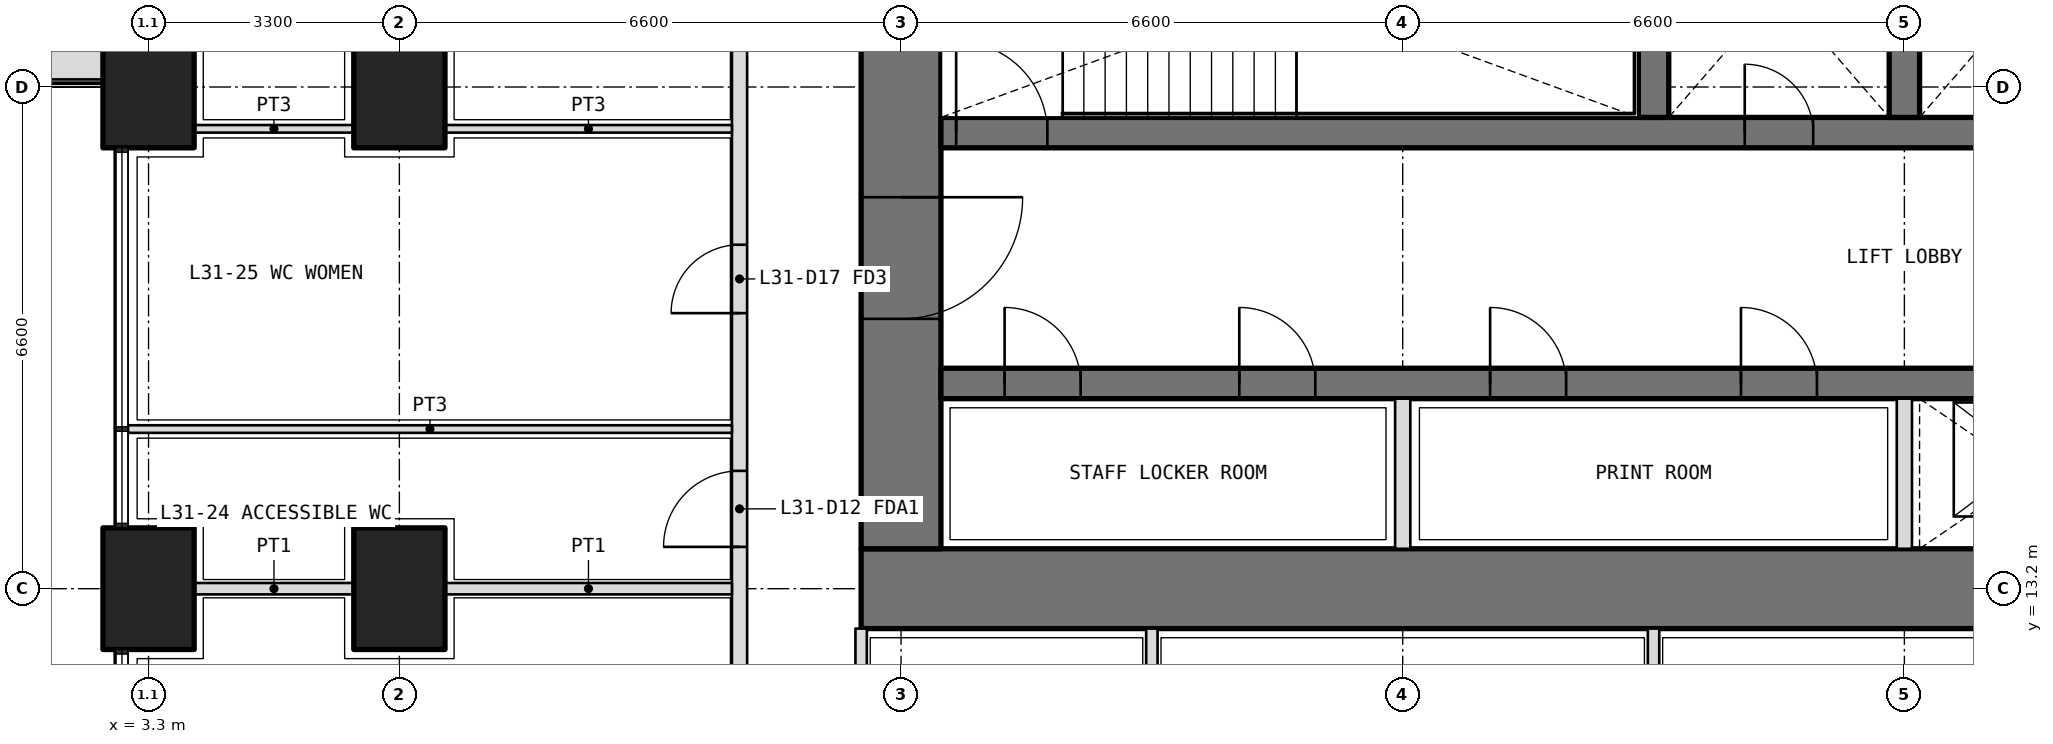
"""IFC4 building model, lengths in metres.
Left out: names, types, materials, properties, quantities, classifications, styles, units other than length and angle.
Written with IfcOpenShell. Run it as: python <this file> out.ifc"""

import sys

from ifc_helpers import new_model, si_unit, direction, frame, frame_2d, origin, origin_2d, place, context, subcontext, project, spatial, polyline, rectangle, outline, extrude, element, fill, save


model = new_model("IFC4")
c1 = context("Model", 3, precision=1e-05, world=origin(), true_north=direction((0.0, 1.0)))
c2 = subcontext(c1, "Body", "Model", "MODEL_VIEW")
j1 = project(units=[si_unit("LENGTHUNIT", "METRE"), si_unit("PLANEANGLEUNIT", "RADIAN")], contexts=[c1])
p1 = place(None, origin())
s1 = spatial("IfcSite", under=j1, at=p1, CompositionType="ELEMENT")
p2 = place(p1, origin())
s2 = spatial("IfcBuilding", under=s1, at=p2, CompositionType="ELEMENT")
p3 = place(p2, frame((0.0, 0.0, 136.8)))
s3 = spatial("IfcBuildingStorey", under=s2, at=p3, CompositionType="ELEMENT", Elevation=136.8)
for number, where, z_axis, x_axis in (
    (1, (3.3, 13.2, 0.0), (0.0, 0.0, 1.0), (0.0, 1.0, 0.0)),
    (2, (3.3, 19.8, 0.0), (0.0, 0.0, 1.0), (0.0, 1.0, 0.0)),
    (3, (6.6, 13.2, 0.0), (0.0, 0.0, 1.0), (0.0, 1.0, 0.0)),
    (4, (6.6, 19.8, 0.0), (0.0, 0.0, 1.0), (0.0, 1.0, 0.0)),
):
    element("IfcColumn", number, at=place(p3, frame(where, z_axis=z_axis, x_axis=x_axis)), inside=s3, PredefinedType="COLUMN", context=c2, shape_type="SweptSolid", body=[
        extrude(rectangle(XDim=1.6, YDim=1.2, at=origin_2d()), origin(), (0.0, 0.0, 1.0), 4.2),
    ])
p4 = place(p3, origin())
e5 = element("IfcWall", 5, at=p4, inside=s3, PredefinedType="USERDEFINED", context=c2, shape_type="SweptSolid", body=[
    extrude(outline(polyline([(1.75, 19.9), (2.75, 19.9), (2.75, 22.35), (1.75, 22.35), (1.75, 19.9)]), holes=[polyline([(1.9, 20.05), (2.6, 20.05), (2.6, 22.2), (1.9, 22.2), (1.9, 20.05)])]), origin(), (0.0, 0.0, 1.0), 1.05),
])
p5 = place(p3, frame((12.675, 13.2, 0.0), z_axis=(0.0, 0.0, 1.0), x_axis=(1.0, 0.0, 0.0)))
e6 = element("IfcWall", 6, at=p5, inside=s3, PredefinedType="SHEAR", context=c2, shape_type="SweptSolid", body=[
    extrude(rectangle(XDim=27.45, YDim=1.05, at=frame_2d((13.725, 0.0))), origin(), (0.0, 0.0, 1.0), 4.2),
])
p6 = place(p3, frame((13.2, 32.475, 0.0), z_axis=(0.0, 0.0, 1.0), x_axis=(0.0, -1.0, 0.0)))
e7 = element("IfcWall", 7, at=p6, inside=s3, PredefinedType="SHEAR", context=c2, shape_type="SweptSolid", body=[
    extrude(rectangle(XDim=18.75, YDim=1.05, at=frame_2d((9.375, 0.0))), origin(), (0.0, 0.0, 1.0), 4.2),
])
p7 = place(p6, frame((14.125, 0.0, 0.0)))
e8 = element("IfcOpeningElement", 8, at=p7, cuts=e7, PredefinedType="OPENING", context=c2, shape_type="SweptSolid", body=[
    extrude(rectangle(XDim=1.6, YDim=2.1, at=frame_2d((0.8, 1.05))), frame((0.0, 0.535, 0.0), z_axis=(0.0, -1.0, 0.0), x_axis=(1.0, 0.0, 0.0)), (0.0, 0.0, 1.0), 1.07),
])
p8 = place(p6, frame((3.325, 0.0, 0.0)))
e9 = element("IfcOpeningElement", 9, at=p8, cuts=e7, PredefinedType="OPENING", context=c2, shape_type="SweptSolid", body=[
    extrude(rectangle(XDim=1.6, YDim=2.1, at=frame_2d((0.8, 1.05))), frame((0.0, 0.535, 0.0), z_axis=(0.0, -1.0, 0.0), x_axis=(1.0, 0.0, 0.0)), (0.0, 0.0, 1.0), 1.07),
])
p9 = place(p3, frame((13.725, 15.9, 0.0), z_axis=(0.0, 0.0, 1.0), x_axis=(1.0, 0.0, 0.0)))
e10 = element("IfcWall", 10, at=p9, inside=s3, PredefinedType="SHEAR", context=c2, shape_type="SweptSolid", body=[
    extrude(rectangle(XDim=25.35, YDim=0.4, at=frame_2d((12.675, 0.0))), origin(), (0.0, 0.0, 1.0), 4.2),
])
p10 = place(p9, frame((0.837, 0.0, 0.0)))
e11 = element("IfcOpeningElement", 11, at=p10, cuts=e10, PredefinedType="OPENING", context=c2, shape_type="SweptSolid", body=[
    extrude(rectangle(XDim=1.0, YDim=2.1, at=frame_2d((0.5, 1.05))), frame((0.0, 0.21, 0.0), z_axis=(0.0, -1.0, 0.0), x_axis=(1.0, 0.0, 0.0)), (0.0, 0.0, 1.0), 0.42),
])
p11 = place(p9, frame((3.925, 0.0, 0.0)))
e12 = element("IfcOpeningElement", 12, at=p11, cuts=e10, PredefinedType="OPENING", context=c2, shape_type="SweptSolid", body=[
    extrude(rectangle(XDim=1.0, YDim=2.1, at=frame_2d((0.5, 1.05))), frame((0.0, 0.21, 0.0), z_axis=(0.0, -1.0, 0.0), x_axis=(1.0, 0.0, 0.0)), (0.0, 0.0, 1.0), 0.42),
])
p12 = place(p9, frame((7.225, 0.0, 0.0)))
e13 = element("IfcOpeningElement", 13, at=p12, cuts=e10, PredefinedType="OPENING", context=c2, shape_type="SweptSolid", body=[
    extrude(rectangle(XDim=1.0, YDim=2.1, at=frame_2d((0.5, 1.05))), frame((0.0, 0.21, 0.0), z_axis=(0.0, -1.0, 0.0), x_axis=(1.0, 0.0, 0.0)), (0.0, 0.0, 1.0), 0.42),
])
p13 = place(p9, frame((10.525, 0.0, 0.0)))
e14 = element("IfcOpeningElement", 14, at=p13, cuts=e10, PredefinedType="OPENING", context=c2, shape_type="SweptSolid", body=[
    extrude(rectangle(XDim=1.0, YDim=2.1, at=frame_2d((0.5, 1.05))), frame((0.0, 0.21, 0.0), z_axis=(0.0, -1.0, 0.0), x_axis=(1.0, 0.0, 0.0)), (0.0, 0.0, 1.0), 0.42),
])
p14 = place(p9, frame((13.775, 0.0, 0.0)))
e15 = element("IfcOpeningElement", 15, at=p14, cuts=e10, PredefinedType="OPENING", context=c2, shape_type="SweptSolid", body=[
    extrude(rectangle(XDim=1.1, YDim=2.1, at=frame_2d((0.55, 1.05))), frame((0.0, 0.21, 0.0), z_axis=(0.0, -1.0, 0.0), x_axis=(1.0, 0.0, 0.0)), (0.0, 0.0, 1.0), 0.42),
])
p15 = place(p9, frame((17.075, 0.0, 0.0)))
e16 = element("IfcOpeningElement", 16, at=p15, cuts=e10, PredefinedType="OPENING", context=c2, shape_type="SweptSolid", body=[
    extrude(rectangle(XDim=1.1, YDim=2.1, at=frame_2d((0.55, 1.05))), frame((0.0, 0.21, 0.0), z_axis=(0.0, -1.0, 0.0), x_axis=(1.0, 0.0, 0.0)), (0.0, 0.0, 1.0), 0.42),
])
p16 = place(p9, frame((20.375, 0.0, 0.0)))
e17 = element("IfcOpeningElement", 17, at=p16, cuts=e10, PredefinedType="OPENING", context=c2, shape_type="SweptSolid", body=[
    extrude(rectangle(XDim=1.1, YDim=2.1, at=frame_2d((0.55, 1.05))), frame((0.0, 0.21, 0.0), z_axis=(0.0, -1.0, 0.0), x_axis=(1.0, 0.0, 0.0)), (0.0, 0.0, 1.0), 0.42),
])
p17 = place(p9, frame((23.462, 0.0, 0.0)))
e18 = element("IfcOpeningElement", 18, at=p17, cuts=e10, PredefinedType="OPENING", context=c2, shape_type="SweptSolid", body=[
    extrude(rectangle(XDim=1.1, YDim=2.1, at=frame_2d((0.55, 1.05))), frame((0.0, 0.21, 0.0), z_axis=(0.0, -1.0, 0.0), x_axis=(1.0, 0.0, 0.0)), (0.0, 0.0, 1.0), 0.42),
])
p18 = place(p3, frame((13.725, 19.2, 0.0), z_axis=(0.0, 0.0, 1.0), x_axis=(1.0, 0.0, 0.0)))
e19 = element("IfcWall", 19, at=p18, inside=s3, PredefinedType="SHEAR", context=c2, shape_type="SweptSolid", body=[
    extrude(rectangle(XDim=25.35, YDim=0.4, at=frame_2d((12.675, 0.0))), origin(), (0.0, 0.0, 1.0), 4.2),
])
p19 = place(p18, frame((10.575, 0.0, 0.0)))
e20 = element("IfcOpeningElement", 20, at=p19, cuts=e19, PredefinedType="OPENING", context=c2, shape_type="SweptSolid", body=[
    extrude(rectangle(XDim=0.9, YDim=2.1, at=frame_2d((0.45, 1.05))), frame((0.0, 0.21, 0.0), z_axis=(0.0, -1.0, 0.0), x_axis=(1.0, 0.0, 0.0)), (0.0, 0.0, 1.0), 0.42),
])
p20 = place(p18, frame((13.875, 0.0, 0.0)))
e21 = element("IfcOpeningElement", 21, at=p20, cuts=e19, PredefinedType="OPENING", context=c2, shape_type="SweptSolid", body=[
    extrude(rectangle(XDim=0.9, YDim=2.1, at=frame_2d((0.45, 1.05))), frame((0.0, 0.21, 0.0), z_axis=(0.0, -1.0, 0.0), x_axis=(1.0, 0.0, 0.0)), (0.0, 0.0, 1.0), 0.42),
])
p21 = place(p18, frame((0.2, 0.0, 0.0)))
e22 = element("IfcOpeningElement", 22, at=p21, cuts=e19, PredefinedType="OPENING", context=c2, shape_type="SweptSolid", body=[
    extrude(rectangle(XDim=1.2, YDim=2.1, at=frame_2d((0.6, 1.05))), frame((0.0, 0.21, 0.0), z_axis=(0.0, -1.0, 0.0), x_axis=(1.0, 0.0, 0.0)), (0.0, 0.0, 1.0), 0.42),
])
p22 = place(p18, frame((23.512, 0.0, 0.0)))
e23 = element("IfcOpeningElement", 23, at=p22, cuts=e19, PredefinedType="OPENING", context=c2, shape_type="SweptSolid", body=[
    extrude(rectangle(XDim=1.1, YDim=2.1, at=frame_2d((0.55, 1.05))), frame((0.0, 0.21, 0.0), z_axis=(0.0, -1.0, 0.0), x_axis=(1.0, 0.0, 0.0)), (0.0, 0.0, 1.0), 0.42),
])
p23 = place(p18, frame((17.125, 0.0, 0.0)))
e24 = element("IfcOpeningElement", 24, at=p23, cuts=e19, PredefinedType="OPENING", context=c2, shape_type="SweptSolid", body=[
    extrude(rectangle(XDim=1.1, YDim=2.1, at=frame_2d((0.55, 1.05))), frame((0.0, 0.21, 0.0), z_axis=(0.0, -1.0, 0.0), x_axis=(1.0, 0.0, 0.0)), (0.0, 0.0, 1.0), 0.42),
])
p24 = place(p18, frame((20.325, 0.0, 0.0)))
e25 = element("IfcOpeningElement", 25, at=p24, cuts=e19, PredefinedType="OPENING", context=c2, shape_type="SweptSolid", body=[
    extrude(rectangle(XDim=1.1, YDim=2.1, at=frame_2d((0.55, 1.05))), frame((0.0, 0.21, 0.0), z_axis=(0.0, -1.0, 0.0), x_axis=(1.0, 0.0, 0.0)), (0.0, 0.0, 1.0), 0.42),
])
for number, where, z_axis, x_axis in (
    (26, (23.1, 19.4, 0.0), (0.0, 0.0, 1.0), (0.0, 1.0, 0.0)),
    (27, (26.4, 19.4, 0.0), (0.0, 0.0, 1.0), (0.0, 1.0, 0.0)),
):
    element("IfcWall", number, at=place(p3, frame(where, z_axis=z_axis, x_axis=x_axis)), inside=s3, PredefinedType="SHEAR", context=c2, shape_type="SweptSolid", body=[
        extrude(rectangle(XDim=3.35, YDim=0.4, at=frame_2d((1.675, 0.0))), origin(), (0.0, 0.0, 1.0), 4.2),
    ])
for number, where, z_axis, x_axis in (
    (28, (19.8, 13.725, 0.0), (0.0, 0.0, 1.0), (0.0, 1.0, 0.0)),
    (29, (26.4, 13.725, 0.0), (0.0, 0.0, 1.0), (0.0, 1.0, 0.0)),
):
    element("IfcWall", number, at=place(p3, frame(where, z_axis=z_axis, x_axis=x_axis)), inside=s3, PredefinedType="PARTITIONING", context=c2, shape_type="SweptSolid", body=[
        extrude(rectangle(XDim=1.975, YDim=0.2, at=frame_2d((0.987, 0.0))), origin(), (0.0, 0.0, 1.0), 4.2),
    ])
p25 = place(p3, frame((12.675, 12.675, 0.0), z_axis=(0.0, 0.0, 1.0), x_axis=(0.0, -1.0, 0.0)))
e30 = element("IfcWall", 30, at=p25, inside=s3, PredefinedType="PARTITIONING", context=c2, shape_type="SweptSolid", body=[
    extrude(rectangle(XDim=3.675, YDim=0.15, at=frame_2d((1.837, 0.0))), origin(), (0.0, 0.0, 1.0), 2.85),
])
for number, where, z_axis, x_axis in (
    (31, (16.5, 12.675, 0.0), (0.0, 0.0, 1.0), (0.0, -1.0, 0.0)),
    (32, (23.1, 12.675, 0.0), (0.0, 0.0, 1.0), (0.0, -1.0, 0.0)),
):
    element("IfcWall", number, at=place(p3, frame(where, z_axis=z_axis, x_axis=x_axis)), inside=s3, PredefinedType="PARTITIONING", context=c2, shape_type="SweptSolid", body=[
        extrude(rectangle(XDim=3.675, YDim=0.15, at=frame_2d((1.837, 0.0))), origin(), (0.0, 0.0, 1.0), 3.9),
    ])
p26 = place(p3, frame((11.075, 7.4, 0.0), z_axis=(0.0, 0.0, 1.0), x_axis=(0.0, 1.0, 0.0)))
e33 = element("IfcWall", 33, at=p26, inside=s3, PredefinedType="PARTITIONING", context=c2, shape_type="SweptSolid", body=[
    extrude(rectangle(XDim=27.625, YDim=0.2, at=frame_2d((13.812, 0.0))), origin(), (0.0, 0.0, 1.0), 2.85),
])
p27 = place(p26, frame((2.35, 0.0, 0.0)))
e34 = element("IfcOpeningElement", 34, at=p27, cuts=e33, PredefinedType="OPENING", context=c2, shape_type="SweptSolid", body=[
    extrude(rectangle(XDim=1.0, YDim=2.1, at=frame_2d((0.5, 1.05))), frame((0.0, 0.11, 0.0), z_axis=(0.0, -1.0, 0.0), x_axis=(1.0, 0.0, 0.0)), (0.0, 0.0, 1.0), 0.22),
])
p28 = place(p26, frame((6.35, 0.0, 0.0)))
e35 = element("IfcOpeningElement", 35, at=p28, cuts=e33, PredefinedType="OPENING", context=c2, shape_type="SweptSolid", body=[
    extrude(rectangle(XDim=1.0, YDim=2.1, at=frame_2d((0.5, 1.05))), frame((0.0, 0.11, 0.0), z_axis=(0.0, -1.0, 0.0), x_axis=(1.0, 0.0, 0.0)), (0.0, 0.0, 1.0), 0.22),
])
p29 = place(p26, frame((9.425, 0.0, 0.0)))
e36 = element("IfcOpeningElement", 36, at=p29, cuts=e33, PredefinedType="OPENING", context=c2, shape_type="SweptSolid", body=[
    extrude(rectangle(XDim=0.9, YDim=2.1, at=frame_2d((0.45, 1.05))), frame((0.0, 0.11, 0.0), z_axis=(0.0, -1.0, 0.0), x_axis=(1.0, 0.0, 0.0)), (0.0, 0.0, 1.0), 0.22),
])
p30 = place(p26, frame((13.275, 0.0, 0.0)))
e37 = element("IfcOpeningElement", 37, at=p30, cuts=e33, PredefinedType="OPENING", context=c2, shape_type="SweptSolid", body=[
    extrude(rectangle(XDim=0.9, YDim=2.1, at=frame_2d((0.45, 1.05))), frame((0.0, 0.11, 0.0), z_axis=(0.0, -1.0, 0.0), x_axis=(1.0, 0.0, 0.0)), (0.0, 0.0, 1.0), 0.22),
])
p31 = place(p26, frame((16.8, 0.0, 0.0)))
e38 = element("IfcOpeningElement", 38, at=p31, cuts=e33, PredefinedType="OPENING", context=c2, shape_type="SweptSolid", body=[
    extrude(rectangle(XDim=1.0, YDim=2.1, at=frame_2d((0.5, 1.05))), frame((0.0, 0.11, 0.0), z_axis=(0.0, -1.0, 0.0), x_axis=(1.0, 0.0, 0.0)), (0.0, 0.0, 1.0), 0.22),
])
p32 = place(p26, frame((21.8, 0.0, 0.0)))
e39 = element("IfcOpeningElement", 39, at=p32, cuts=e33, PredefinedType="OPENING", context=c2, shape_type="SweptSolid", body=[
    extrude(rectangle(XDim=1.0, YDim=2.1, at=frame_2d((0.5, 1.05))), frame((0.0, 0.11, 0.0), z_axis=(0.0, -1.0, 0.0), x_axis=(1.0, 0.0, 0.0)), (0.0, 0.0, 1.0), 0.22),
])
p33 = place(p26, frame((26.163, 0.0, 0.0)))
e40 = element("IfcOpeningElement", 40, at=p33, cuts=e33, PredefinedType="OPENING", context=c2, shape_type="SweptSolid", body=[
    extrude(rectangle(XDim=1.0, YDim=2.1, at=frame_2d((0.5, 1.05))), frame((0.0, 0.11, 0.0), z_axis=(0.0, -1.0, 0.0), x_axis=(1.0, 0.0, 0.0)), (0.0, 0.0, 1.0), 0.22),
])
p34 = place(p3, frame((3.03, 15.3, 0.0), z_axis=(0.0, 0.0, 1.0), x_axis=(1.0, 0.0, 0.0)))
e41 = element("IfcWall", 41, at=p34, inside=s3, PredefinedType="PARTITIONING", context=c2, shape_type="SweptSolid", body=[
    extrude(rectangle(XDim=7.945, YDim=0.1, at=frame_2d((3.973, 0.0))), origin(), (0.0, 0.0, 1.0), 2.6),
])
p35 = place(p3, frame((3.9, 19.25, 0.0), z_axis=(0.0, 0.0, 1.0), x_axis=(1.0, 0.0, 0.0)))
e42 = element("IfcWall", 42, at=p35, inside=s3, PredefinedType="PARTITIONING", context=c2, shape_type="SweptSolid", body=[
    extrude(rectangle(XDim=2.1, YDim=0.1, at=frame_2d((1.05, 0.0))), origin(), (0.0, 0.0, 1.0), 2.85),
])
p36 = place(p3, frame((7.2, 19.25, 0.0), z_axis=(0.0, 0.0, 1.0), x_axis=(1.0, 0.0, 0.0)))
e43 = element("IfcWall", 43, at=p36, inside=s3, PredefinedType="PARTITIONING", context=c2, shape_type="SweptSolid", body=[
    extrude(rectangle(XDim=3.775, YDim=0.1, at=frame_2d((1.888, 0.0))), origin(), (0.0, 0.0, 1.0), 2.85),
])
p37 = place(p3, frame((3.9, 13.2, 0.0), z_axis=(0.0, 0.0, 1.0), x_axis=(1.0, 0.0, 0.0)))
e44 = element("IfcWall", 44, at=p37, inside=s3, PredefinedType="PARTITIONING", context=c2, shape_type="SweptSolid", body=[
    extrude(rectangle(XDim=2.1, YDim=0.15, at=frame_2d((1.05, 0.0))), origin(), (0.0, 0.0, 1.0), 2.85),
])
p38 = place(p3, frame((7.2, 13.2, 0.0), z_axis=(0.0, 0.0, 1.0), x_axis=(1.0, 0.0, 0.0)))
e45 = element("IfcWall", 45, at=p38, inside=s3, PredefinedType="PARTITIONING", context=c2, shape_type="SweptSolid", body=[
    extrude(rectangle(XDim=3.775, YDim=0.15, at=frame_2d((1.888, 0.0))), origin(), (0.0, 0.0, 1.0), 2.85),
])
p39 = place(p28, origin())
e46 = element("IfcDoor", 46, at=p39, inside=s3, OperationType="SINGLE_SWING_LEFT", PredefinedType="DOOR", context=c2, shape_type="SweptSolid", body=[
    extrude(rectangle(XDim=1.0, YDim=2.1, at=frame_2d((0.5, 1.05))), frame((0.0, 0.025, 0.0), z_axis=(0.0, -1.0, 0.0), x_axis=(1.0, 0.0, 0.0)), (0.0, 0.0, 1.0), 0.05),
])
fill(e35, e46)
p40 = place(p29, origin())
e47 = element("IfcDoor", 47, at=p40, inside=s3, OperationType="SINGLE_SWING_LEFT", PredefinedType="DOOR", context=c2, shape_type="SweptSolid", body=[
    extrude(rectangle(XDim=0.9, YDim=2.1, at=frame_2d((0.45, 1.05))), frame((0.0, 0.025, 0.0), z_axis=(0.0, -1.0, 0.0), x_axis=(1.0, 0.0, 0.0)), (0.0, 0.0, 1.0), 0.05),
])
fill(e36, e47)
p41 = place(p19, origin())
e48 = element("IfcDoor", 48, at=p41, inside=s3, OperationType="SINGLE_SWING_LEFT", PredefinedType="DOOR", context=c2, shape_type="SweptSolid", body=[
    extrude(rectangle(XDim=0.9, YDim=2.1, at=frame_2d((0.45, 1.05))), frame((0.0, 0.025, 0.0), z_axis=(0.0, -1.0, 0.0), x_axis=(1.0, 0.0, 0.0)), (0.0, 0.0, 1.0), 0.05),
])
fill(e20, e48)
p42 = place(p10, origin())
e49 = element("IfcDoor", 49, at=p42, inside=s3, OperationType="SINGLE_SWING_LEFT", PredefinedType="DOOR", context=c2, shape_type="SweptSolid", body=[
    extrude(rectangle(XDim=1.0, YDim=2.1, at=frame_2d((0.5, 1.05))), frame((0.0, 0.025, 0.0), z_axis=(0.0, -1.0, 0.0), x_axis=(1.0, 0.0, 0.0)), (0.0, 0.0, 1.0), 0.05),
])
fill(e11, e49)
p43 = place(p11, origin())
e50 = element("IfcDoor", 50, at=p43, inside=s3, OperationType="SINGLE_SWING_LEFT", PredefinedType="DOOR", context=c2, shape_type="SweptSolid", body=[
    extrude(rectangle(XDim=1.0, YDim=2.1, at=frame_2d((0.5, 1.05))), frame((0.0, 0.025, 0.0), z_axis=(0.0, -1.0, 0.0), x_axis=(1.0, 0.0, 0.0)), (0.0, 0.0, 1.0), 0.05),
])
fill(e12, e50)
p44 = place(p12, origin())
e51 = element("IfcDoor", 51, at=p44, inside=s3, OperationType="SINGLE_SWING_LEFT", PredefinedType="DOOR", context=c2, shape_type="SweptSolid", body=[
    extrude(rectangle(XDim=1.0, YDim=2.1, at=frame_2d((0.5, 1.05))), frame((0.0, 0.025, 0.0), z_axis=(0.0, -1.0, 0.0), x_axis=(1.0, 0.0, 0.0)), (0.0, 0.0, 1.0), 0.05),
])
fill(e13, e51)
p45 = place(p13, origin())
e52 = element("IfcDoor", 52, at=p45, inside=s3, OperationType="SINGLE_SWING_LEFT", PredefinedType="DOOR", context=c2, shape_type="SweptSolid", body=[
    extrude(rectangle(XDim=1.0, YDim=2.1, at=frame_2d((0.5, 1.05))), frame((0.0, 0.025, 0.0), z_axis=(0.0, -1.0, 0.0), x_axis=(1.0, 0.0, 0.0)), (0.0, 0.0, 1.0), 0.05),
])
fill(e14, e52)
p46 = place(p21, origin())
e53 = element("IfcDoor", 53, at=p46, inside=s3, OperationType="SINGLE_SWING_LEFT", PredefinedType="DOOR", context=c2, shape_type="SweptSolid", body=[
    extrude(rectangle(XDim=1.2, YDim=2.1, at=frame_2d((0.6, 1.05))), frame((0.0, 0.025, 0.0), z_axis=(0.0, -1.0, 0.0), x_axis=(1.0, 0.0, 0.0)), (0.0, 0.0, 1.0), 0.05),
])
fill(e22, e53)
p47 = place(p7, origin())
e54 = element("IfcDoor", 54, at=p47, inside=s3, OperationType="DOUBLE_DOOR_DOUBLE_SWING", PredefinedType="DOOR", context=c2, shape_type="SweptSolid", body=[
    extrude(rectangle(XDim=1.6, YDim=2.1, at=frame_2d((0.8, 1.05))), frame((0.0, 0.025, 0.0), z_axis=(0.0, -1.0, 0.0), x_axis=(1.0, 0.0, 0.0)), (0.0, 0.0, 1.0), 0.05),
])
fill(e8, e54)
save(model, sys.argv[1])
